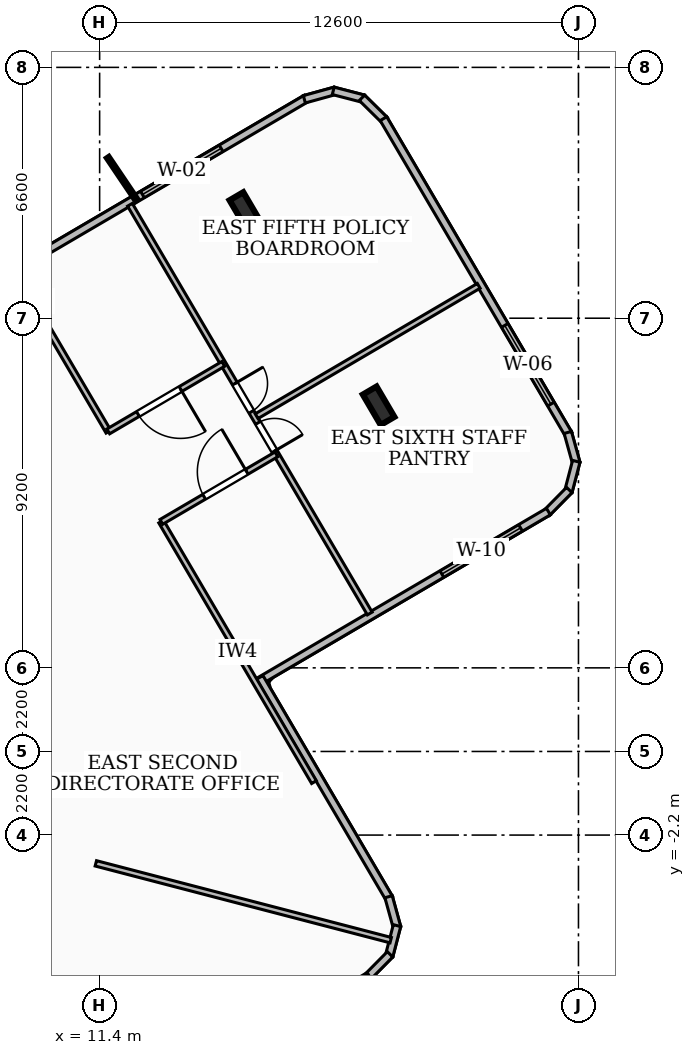
"""IFC4 building model, lengths in metres.
Left out: names, types, materials, properties, quantities, classifications, styles, units other than length and angle.
Written with IfcOpenShell. Run it as: python <this file> out.ifc"""

import sys

from ifc_helpers import new_model, si_unit, direction, frame, frame_2d, origin, origin_2d, place, context, subcontext, project, spatial, rectangle, i_section, extrude, element, fill, save


model = new_model("IFC4")
c1 = context("Model", 3, precision=1e-05, world=origin(), true_north=direction((0.0, 1.0)))
c2 = subcontext(c1, "Body", "Model", "MODEL_VIEW")
j1 = project(units=[si_unit("LENGTHUNIT", "METRE"), si_unit("PLANEANGLEUNIT", "RADIAN")], contexts=[c1])
p1 = place(None, origin())
s1 = spatial("IfcSite", under=j1, at=p1, CompositionType="ELEMENT")
p2 = place(p1, origin())
s2 = spatial("IfcBuilding", under=s1, at=p2, CompositionType="ELEMENT")
p3 = place(p2, frame((0.0, 0.0, 208.62)))
s3 = spatial("IfcBuildingStorey", under=s2, at=p3, CompositionType="ELEMENT", Elevation=208.62)
for number, where, z_axis, x_axis in (
    (1, (18.741, 9.097, 0.0), (0.0, 0.0, 1.0), (0.863, 0.506, 0.0)),
    (2, (15.234, 14.209, 0.0), (0.0, 0.0, 1.0), (0.863, 0.506, 0.0)),
):
    element("IfcColumn", number, at=place(p3, frame(where, z_axis=z_axis, x_axis=x_axis)), inside=s3, PredefinedType="COLUMN", context=c2, shape_type="SweptSolid", body=[
        extrude(i_section(OverallWidth=0.418, OverallDepth=0.927, WebThickness=0.019, FlangeThickness=0.032, at=origin_2d()), origin(), (0.0, 0.0, 1.0), 3.42),
    ])
p4 = place(p3, frame((9.206, 12.707, 0.0), z_axis=(0.0, 0.0, 1.0), x_axis=(0.862602827395, 0.505881766988, 0.0)))
e3 = element("IfcWall", 3, at=p4, inside=s3, PredefinedType="SOLIDWALL", context=c2, shape_type="SweptSolid", body=[
    extrude(rectangle(XDim=8.842, YDim=0.2, at=frame_2d((4.421, 0.0))), origin(), (0.0, 0.0, 1.0), 3.16),
])
p5 = place(p4, frame((3.85, 0.0, 0.85)))
e4 = element("IfcOpeningElement", 4, at=p5, cuts=e3, PredefinedType="OPENING", context=c2, shape_type="SweptSolid", body=[
    extrude(rectangle(XDim=2.4, YDim=2.1, at=frame_2d((1.2, 1.05))), frame((0.0, 0.11, 0.0), z_axis=(0.0, -1.0, 0.0), x_axis=(1.0, 0.0, 0.0)), (0.0, 0.0, 1.0), 0.22),
])
p6 = place(p3, frame((16.787, 17.16, 0.0), z_axis=(0.0, 0.0, 1.0), x_axis=(0.963905015631, 0.266246353668, 0.0)))
e5 = element("IfcWall", 5, at=p6, inside=s3, PredefinedType="SOLIDWALL", context=c2, shape_type="SweptSolid", body=[
    extrude(rectangle(XDim=0.838, YDim=0.2, at=frame_2d((0.419, 0.0))), origin(), (0.0, 0.0, 1.0), 3.16),
])
p7 = place(p3, frame((17.547, 17.382, 0.0), z_axis=(0.0, 0.0, 1.0), x_axis=(0.967943577658, -0.251167733737, 0.0)))
e6 = element("IfcWall", 6, at=p7, inside=s3, PredefinedType="SOLIDWALL", context=c2, shape_type="SweptSolid", body=[
    extrude(rectangle(XDim=0.824, YDim=0.2, at=frame_2d((0.412, 0.0))), origin(), (0.0, 0.0, 1.0), 3.16),
])
p8 = place(p3, frame((18.303, 17.199, 0.0), z_axis=(0.0, 0.0, 1.0), x_axis=(0.711894657832, -0.702286263677, 0.0)))
e7 = element("IfcWall", 7, at=p8, inside=s3, PredefinedType="SOLIDWALL", context=c2, shape_type="SweptSolid", body=[
    extrude(rectangle(XDim=0.838, YDim=0.2, at=frame_2d((0.419, 0.0))), origin(), (0.0, 0.0, 1.0), 3.16),
])
p9 = place(p3, frame((18.869, 16.65, 0.0), z_axis=(0.0, 0.0, 1.0), x_axis=(0.505984418435, -0.862542618252, 0.0)))
e8 = element("IfcWall", 8, at=p9, inside=s3, PredefinedType="SOLIDWALL", context=c2, shape_type="SweptSolid", body=[
    extrude(rectangle(XDim=9.625, YDim=0.2, at=frame_2d((4.812, 0.0))), origin(), (0.0, 0.0, 1.0), 3.16),
])
p10 = place(p9, frame((6.307, 0.0, 0.85)))
e9 = element("IfcOpeningElement", 9, at=p10, cuts=e8, PredefinedType="OPENING", context=c2, shape_type="SweptSolid", body=[
    extrude(rectangle(XDim=2.4, YDim=1.85, at=frame_2d((1.2, 0.925))), frame((0.0, 0.11, 0.0), z_axis=(0.0, -1.0, 0.0), x_axis=(1.0, 0.0, 0.0)), (0.0, 0.0, 1.0), 0.22),
])
p11 = place(p3, frame((23.719, 8.394, 0.0), z_axis=(0.0, 0.0, 1.0), x_axis=(0.267253449678, -0.963626272803, 0.0)))
e10 = element("IfcWall", 10, at=p11, inside=s3, PredefinedType="SOLIDWALL", context=c2, shape_type="SweptSolid", body=[
    extrude(rectangle(XDim=0.839, YDim=0.2, at=frame_2d((0.419, 0.0))), origin(), (0.0, 0.0, 1.0), 3.16),
])
p12 = place(p3, frame((23.942, 7.634, 0.0), z_axis=(0.0, 0.0, 1.0), x_axis=(-0.252494280442, -0.967598386906, 0.0)))
e11 = element("IfcWall", 11, at=p12, inside=s3, PredefinedType="SOLIDWALL", context=c2, shape_type="SweptSolid", body=[
    extrude(rectangle(XDim=0.824, YDim=0.2, at=frame_2d((0.412, 0.0))), origin(), (0.0, 0.0, 1.0), 3.16),
])
p13 = place(p3, frame((23.758, 6.879, 0.0), z_axis=(0.0, 0.0, 1.0), x_axis=(-0.701851868682, -0.712322928472, 0.0)))
e12 = element("IfcWall", 12, at=p13, inside=s3, PredefinedType="SOLIDWALL", context=c2, shape_type="SweptSolid", body=[
    extrude(rectangle(XDim=0.839, YDim=0.2, at=frame_2d((0.42, 0.0))), origin(), (0.0, 0.0, 1.0), 3.16),
])
p14 = place(p3, frame((23.209, 6.312, 0.0), z_axis=(0.0, 0.0, 1.0), x_axis=(-0.862602827395, -0.505881766988, 0.0)))
e13 = element("IfcWall", 13, at=p14, inside=s3, PredefinedType="SOLIDWALL", context=c2, shape_type="SweptSolid", body=[
    extrude(rectangle(XDim=8.842, YDim=0.2, at=frame_2d((4.421, 0.0))), origin(), (0.0, 0.0, 1.0), 3.16),
])
p15 = place(p14, frame((0.85, 0.0, 0.85)))
e14 = element("IfcOpeningElement", 14, at=p15, cuts=e13, PredefinedType="OPENING", context=c2, shape_type="SweptSolid", body=[
    extrude(rectangle(XDim=2.4, YDim=1.65, at=frame_2d((1.2, 0.825))), frame((0.0, 0.11, 0.0), z_axis=(0.0, -1.0, 0.0), x_axis=(1.0, 0.0, 0.0)), (0.0, 0.0, 1.0), 0.22),
])
p16 = place(p3, frame((15.611, 1.948, 0.0), z_axis=(0.0, 0.0, 1.0), x_axis=(0.505999167705, -0.862533965872, 0.0)))
e15 = element("IfcWall", 15, at=p16, inside=s3, PredefinedType="SOLIDWALL", context=c2, shape_type="SweptSolid", body=[
    extrude(rectangle(XDim=6.743, YDim=0.2, at=frame_2d((3.372, 0.0))), origin(), (0.0, 0.0, 1.0), 3.16),
])
p17 = place(p3, frame((19.003, -3.822, 0.0), z_axis=(0.0, 0.0, 1.0), x_axis=(0.266246353668, -0.963905015631, 0.0)))
e16 = element("IfcWall", 16, at=p17, inside=s3, PredefinedType="SOLIDWALL", context=c2, shape_type="SweptSolid", body=[
    extrude(rectangle(XDim=0.838, YDim=0.2, at=frame_2d((0.419, 0.0))), origin(), (0.0, 0.0, 1.0), 3.16),
])
p18 = place(p3, frame((19.225, -4.582, 0.0), z_axis=(0.0, 0.0, 1.0), x_axis=(-0.251167733737, -0.967943577658, 0.0)))
e17 = element("IfcWall", 17, at=p18, inside=s3, PredefinedType="SOLIDWALL", context=c2, shape_type="SweptSolid", body=[
    extrude(rectangle(XDim=0.824, YDim=0.2, at=frame_2d((0.412, 0.0))), origin(), (0.0, 0.0, 1.0), 3.16),
])
p19 = place(p3, frame((19.042, -5.338, 0.0), z_axis=(0.0, 0.0, 1.0), x_axis=(-0.702877524881, -0.711310891957, 0.0)))
e18 = element("IfcWall", 18, at=p19, inside=s3, PredefinedType="SOLIDWALL", context=c2, shape_type="SweptSolid", body=[
    extrude(rectangle(XDim=0.84, YDim=0.2, at=frame_2d((0.42, 0.0))), origin(), (0.0, 0.0, 1.0), 3.16),
])
p20 = place(p3, frame((18.492, -5.904, 0.0), z_axis=(0.0, 0.0, 1.0), x_axis=(-0.86245977502, -0.506125613333, 0.0)))
e19 = element("IfcWall", 19, at=p20, inside=s3, PredefinedType="SOLIDWALL", context=c2, shape_type="SweptSolid", body=[
    extrude(rectangle(XDim=6.741, YDim=0.2, at=frame_2d((3.371, 0.0))), origin(), (0.0, 0.0, 1.0), 3.16),
])
p21 = place(p3, frame((11.3, -2.944, 0.0), z_axis=(0.0, 0.0, 1.0), x_axis=(0.967711624716, -0.252059936106, 0.0)))
e20 = element("IfcWall", 20, at=p21, inside=s3, PredefinedType="PARTITIONING", context=c2, shape_type="SweptSolid", body=[
    extrude(rectangle(XDim=8.018, YDim=0.145, at=frame_2d((4.009, 0.0))), origin(), (0.0, 0.0, 1.0), 3.16),
])
p22 = place(p3, frame((11.632, 8.413, 0.0), z_axis=(0.0, 0.0, 1.0), x_axis=(-0.506057561451, 0.862499706955, 0.0)))
e21 = element("IfcWall", 21, at=p22, inside=s3, PredefinedType="PARTITIONING", context=c2, shape_type="SweptSolid", body=[
    extrude(rectangle(XDim=7.95, YDim=0.145, at=frame_2d((3.975, 0.0))), origin(), (0.0, 0.0, 1.0), 2.53),
])
p23 = place(p3, frame((17.041, -0.807, 0.0), z_axis=(0.0, 0.0, 1.0), x_axis=(-0.505943324238, 0.862566723598, 0.0)))
e22 = element("IfcWall", 22, at=p23, inside=s3, PredefinedType="PARTITIONING", context=c2, shape_type="SweptSolid", body=[
    extrude(rectangle(XDim=7.949, YDim=0.145, at=frame_2d((3.975, 0.0))), origin(), (0.0, 0.0, 1.0), 3.16),
])
p24 = place(p3, frame((14.654, 10.198, 0.0), z_axis=(0.0, 0.0, 1.0), x_axis=(-0.862375516706, -0.506269165747, 0.0)))
e23 = element("IfcWall", 23, at=p24, inside=s3, PredefinedType="PARTITIONING", context=c2, shape_type="SweptSolid", body=[
    extrude(rectangle(XDim=3.51, YDim=0.145, at=frame_2d((1.755, 0.0))), origin(), (0.0, 0.0, 1.0), 2.53),
])
p25 = place(p24, frame((1.305, 0.0, 0.0)))
e24 = element("IfcOpeningElement", 24, at=p25, cuts=e23, PredefinedType="OPENING", context=c2, shape_type="SweptSolid", body=[
    extrude(rectangle(XDim=1.3, YDim=2.1, at=frame_2d((0.65, 1.05))), frame((0.0, 0.083, 0.0), z_axis=(0.0, -1.0, 0.0), x_axis=(1.0, 0.0, 0.0)), (0.0, 0.0, 1.0), 0.165),
])
p26 = place(p3, frame((13.024, 6.041, 0.0), z_axis=(0.0, 0.0, 1.0), x_axis=(0.862527334663, 0.506010471195, 0.0)))
e25 = element("IfcWall", 25, at=p26, inside=s3, PredefinedType="PARTITIONING", context=c2, shape_type="SweptSolid", body=[
    extrude(rectangle(XDim=3.51, YDim=0.145, at=frame_2d((1.755, 0.0))), origin(), (0.0, 0.0, 1.0), 3.16),
])
p27 = place(p26, frame((1.305, 0.0, 0.0)))
e26 = element("IfcOpeningElement", 26, at=p27, cuts=e25, PredefinedType="OPENING", context=c2, shape_type="SweptSolid", body=[
    extrude(rectangle(XDim=1.3, YDim=2.1, at=frame_2d((0.65, 1.05))), frame((0.0, 0.083, 0.0), z_axis=(0.0, -1.0, 0.0), x_axis=(1.0, 0.0, 0.0)), (0.0, 0.0, 1.0), 0.165),
])
p28 = place(p3, frame((15.531, 8.822, 0.0), z_axis=(0.0, 0.0, 1.0), x_axis=(0.862494081005, 0.506067149923, 0.0)))
e27 = element("IfcWall", 27, at=p28, inside=s3, PredefinedType="PARTITIONING", context=c2, shape_type="SweptSolid", body=[
    extrude(rectangle(XDim=6.776, YDim=0.145, at=frame_2d((3.388, 0.0))), origin(), (0.0, 0.0, 1.0), 2.53),
])
p29 = place(p3, frame((12.198, 14.385, 0.0), z_axis=(0.0, 0.0, 1.0), x_axis=(0.506037527975, -0.862511460956, 0.0)))
e28 = element("IfcWall", 28, at=p29, inside=s3, PredefinedType="PARTITIONING", context=c2, shape_type="SweptSolid", body=[
    extrude(rectangle(XDim=12.469, YDim=0.145, at=frame_2d((6.235, 0.0))), origin(), (0.0, 0.0, 1.0), 2.53),
])
p30 = place(p29, frame((6.655, 0.0, 0.0)))
e29 = element("IfcOpeningElement", 29, at=p30, cuts=e28, PredefinedType="OPENING", context=c2, shape_type="SweptSolid", body=[
    extrude(rectangle(XDim=0.86, YDim=2.04, at=frame_2d((0.43, 1.02))), frame((0.0, 0.083, 0.0), z_axis=(0.0, -1.0, 0.0), x_axis=(1.0, 0.0, 0.0)), (0.0, 0.0, 1.0), 0.165),
])
p31 = place(p29, frame((5.455, 0.0, 0.0)))
e30 = element("IfcOpeningElement", 30, at=p31, cuts=e28, PredefinedType="OPENING", context=c2, shape_type="SweptSolid", body=[
    extrude(rectangle(XDim=0.86, YDim=2.04, at=frame_2d((0.43, 1.02))), frame((0.0, 0.083, 0.0), z_axis=(0.0, -1.0, 0.0), x_axis=(1.0, 0.0, 0.0)), (0.0, 0.0, 1.0), 0.165),
])
p32 = place(p5, origin())
e31 = element("IfcWindow", 31, at=p32, inside=s3, PartitioningType="SINGLE_PANEL", PredefinedType="WINDOW", context=c2, shape_type="SweptSolid", body=[
    extrude(rectangle(XDim=2.4, YDim=2.1, at=frame_2d((1.2, 1.05))), frame((0.0, 0.03, 0.0), z_axis=(0.0, -1.0, 0.0), x_axis=(1.0, 0.0, 0.0)), (0.0, 0.0, 1.0), 0.06),
])
fill(e4, e31)
p33 = place(p10, origin())
e32 = element("IfcWindow", 32, at=p33, inside=s3, PartitioningType="SINGLE_PANEL", PredefinedType="WINDOW", context=c2, shape_type="SweptSolid", body=[
    extrude(rectangle(XDim=2.4, YDim=1.85, at=frame_2d((1.2, 0.925))), frame((0.0, 0.03, 0.0), z_axis=(0.0, -1.0, 0.0), x_axis=(1.0, 0.0, 0.0)), (0.0, 0.0, 1.0), 0.06),
])
fill(e9, e32)
p34 = place(p15, origin())
e33 = element("IfcWindow", 33, at=p34, inside=s3, PartitioningType="SINGLE_PANEL", PredefinedType="WINDOW", context=c2, shape_type="SweptSolid", body=[
    extrude(rectangle(XDim=2.4, YDim=1.65, at=frame_2d((1.2, 0.825))), frame((0.0, 0.03, 0.0), z_axis=(0.0, -1.0, 0.0), x_axis=(1.0, 0.0, 0.0)), (0.0, 0.0, 1.0), 0.06),
])
fill(e14, e33)
p35 = place(p25, origin())
e34 = element("IfcDoor", 34, at=p35, inside=s3, OperationType="SINGLE_SWING_LEFT", PredefinedType="DOOR", context=c2, shape_type="SweptSolid", body=[
    extrude(rectangle(XDim=1.3, YDim=2.1, at=frame_2d((0.65, 1.05))), frame((0.0, 0.025, 0.0), z_axis=(0.0, -1.0, 0.0), x_axis=(1.0, 0.0, 0.0)), (0.0, 0.0, 1.0), 0.05),
])
fill(e24, e34)
p36 = place(p27, origin())
e35 = element("IfcDoor", 35, at=p36, inside=s3, OperationType="SINGLE_SWING_RIGHT", PredefinedType="DOOR", context=c2, shape_type="SweptSolid", body=[
    extrude(rectangle(XDim=1.3, YDim=2.1, at=frame_2d((0.65, 1.05))), frame((0.0, 0.025, 0.0), z_axis=(0.0, -1.0, 0.0), x_axis=(1.0, 0.0, 0.0)), (0.0, 0.0, 1.0), 0.05),
])
fill(e26, e35)
p37 = place(p30, origin())
e36 = element("IfcDoor", 36, at=p37, inside=s3, OperationType="SINGLE_SWING_RIGHT", PredefinedType="DOOR", context=c2, shape_type="SweptSolid", body=[
    extrude(rectangle(XDim=0.86, YDim=2.04, at=frame_2d((0.43, 1.02))), frame((0.0, 0.025, 0.0), z_axis=(0.0, -1.0, 0.0), x_axis=(1.0, 0.0, 0.0)), (0.0, 0.0, 1.0), 0.05),
])
fill(e29, e36)
p38 = place(p31, origin())
e37 = element("IfcDoor", 37, at=p38, inside=s3, OperationType="SINGLE_SWING_LEFT", PredefinedType="DOOR", context=c2, shape_type="SweptSolid", body=[
    extrude(rectangle(XDim=0.86, YDim=2.04, at=frame_2d((0.43, 1.02))), frame((0.0, 0.025, 0.0), z_axis=(0.0, -1.0, 0.0), x_axis=(1.0, 0.0, 0.0)), (0.0, 0.0, 1.0), 0.05),
])
fill(e30, e37)
save(model, sys.argv[1])
